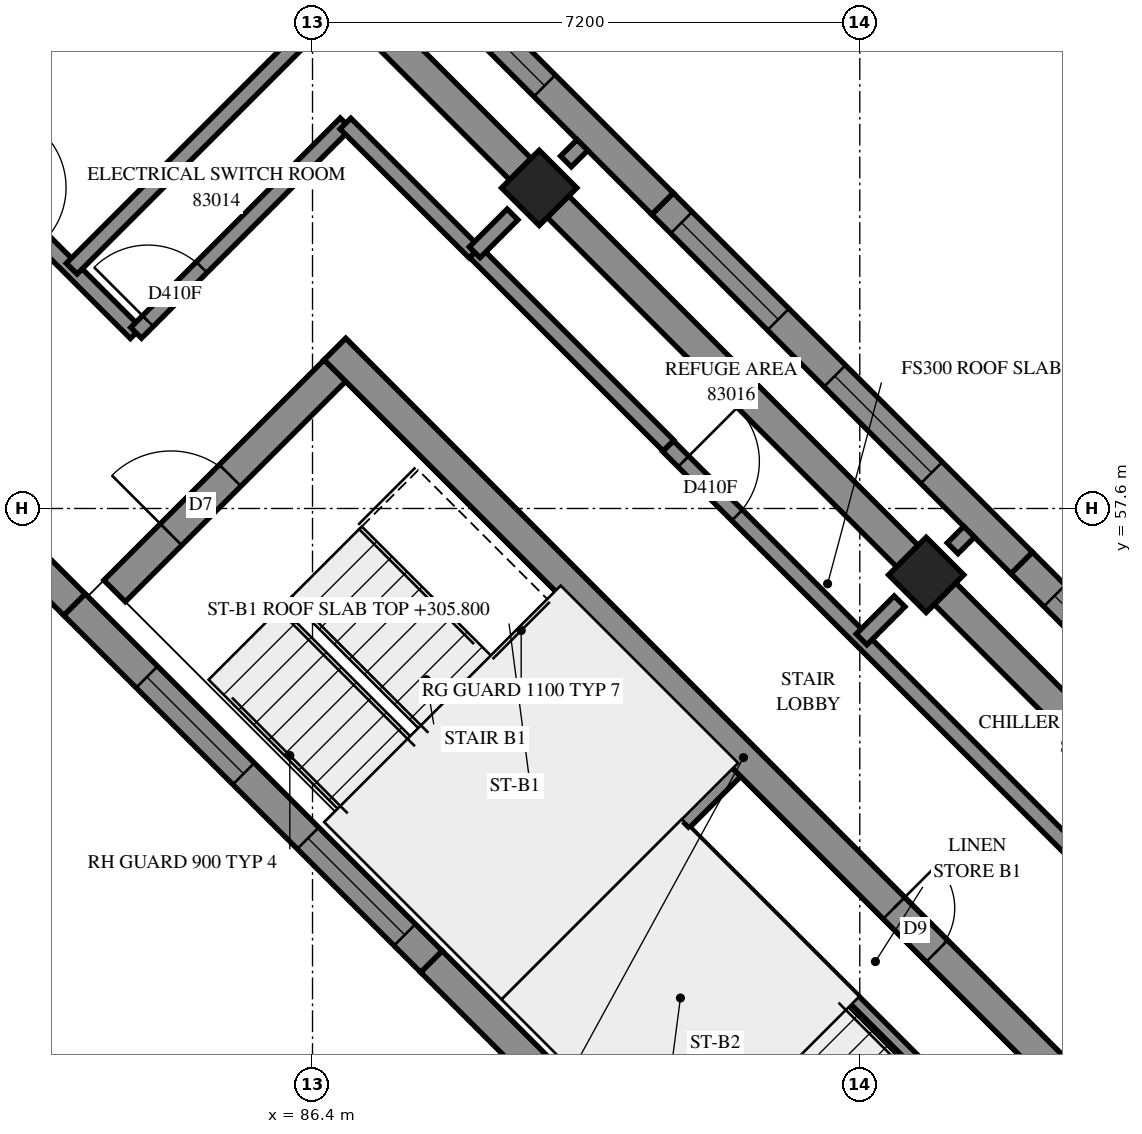
"""IFC4 building model, lengths in metres.
Left out: names, types, materials, properties, quantities, classifications, styles, units other than length and angle.
Written with IfcOpenShell. Run it as: python <this file> out.ifc"""

import sys

from ifc_helpers import new_model, si_unit, direction, frame, frame_2d, origin, origin_2d, place, context, subcontext, project, spatial, polyline, rectangle, outline, extrude, element, fill, save


model = new_model("IFC4")
c1 = context("Model", 3, precision=1e-05, world=origin(), true_north=direction((0.0, 1.0)))
c2 = subcontext(c1, "Body", "Model", "MODEL_VIEW")
j1 = project(units=[si_unit("LENGTHUNIT", "METRE"), si_unit("PLANEANGLEUNIT", "RADIAN")], contexts=[c1])
p1 = place(None, origin())
s1 = spatial("IfcSite", under=j1, at=p1, CompositionType="ELEMENT")
p2 = place(p1, origin())
s2 = spatial("IfcBuilding", under=s1, at=p2, CompositionType="ELEMENT")
p3 = place(p2, frame((0.0, 0.0, 305.8)))
s3 = spatial("IfcBuildingStorey", under=s2, at=p3, CompositionType="ELEMENT", Elevation=305.8)
for number, where, z_axis, x_axis in (
    (1, (89.382, 61.818, 0.0), (0.0, 0.0, 1.0), (0.707, -0.707, 0.0)),
    (2, (94.474, 56.727, 0.0), (0.0, 0.0, 1.0), (0.707, -0.707, 0.0)),
):
    element("IfcColumn", number, at=place(p3, frame(where, z_axis=z_axis, x_axis=x_axis)), inside=s3, PredefinedType="COLUMN", context=c2, shape_type="SweptSolid", body=[
        extrude(rectangle(XDim=0.7, YDim=0.7, at=origin_2d()), origin(), (0.0, 0.0, 1.0), 3.5),
    ])
p4 = place(p3, frame((86.695, 59.696, -0.3), z_axis=(0.0, 0.0, 1.0), x_axis=(0.7071100706, -0.7071034917, 0.0)))
e3 = element("IfcWall", 3, at=p4, inside=s3, PredefinedType="SHEAR", context=c2, shape_type="SweptSolid", body=[
    extrude(outline(polyline([(0.0, 0.0), (15.2, 0.0), (15.2, 3.1), (0.0, 3.1), (0.0, 0.0)])), frame((0.0, 0.2, 0.0), z_axis=(0.0, -1.0, 0.0), x_axis=(1.0, 0.0, 0.0)), (0.0, 0.0, 1.0), 0.4),
])
p5 = place(p4, frame((10.4, 0.0, 0.3)))
e4 = element("IfcOpeningElement", 4, at=p5, cuts=e3, PredefinedType="OPENING", context=c2, shape_type="SweptSolid", body=[
    extrude(rectangle(XDim=0.8, YDim=2.1, at=frame_2d((0.4, 1.05))), frame((0.0, 0.21, 0.0), z_axis=(0.0, -1.0, 0.0), x_axis=(1.0, 0.0, 0.0)), (0.0, 0.0, 1.0), 0.42),
])
p6 = place(p3, frame((83.796, 56.514, -0.3), z_axis=(0.0, 0.0, 1.0), x_axis=(0.7071067812, 0.7071067812, 0.0)))
e5 = element("IfcWall", 5, at=p6, inside=s3, PredefinedType="SHEAR", context=c2, shape_type="SweptSolid", body=[
    extrude(outline(polyline([(0.0, 0.0), (4.1, 0.0), (4.1, 3.1), (0.0, 3.1), (0.0, 0.0)])), frame((0.0, 0.2, 0.0), z_axis=(0.0, -1.0, 0.0), x_axis=(1.0, 0.0, 0.0)), (0.0, 0.0, 1.0), 0.4),
])
p7 = place(p6, frame((1.05, 0.0, 0.3)))
e6 = element("IfcOpeningElement", 6, at=p7, cuts=e5, PredefinedType="OPENING", context=c2, shape_type="SweptSolid", body=[
    extrude(rectangle(XDim=1.1, YDim=2.1, at=frame_2d((0.55, 1.05))), frame((0.0, 0.21, 0.0), z_axis=(0.0, -1.0, 0.0), x_axis=(1.0, 0.0, 0.0)), (0.0, 0.0, 1.0), 0.42),
])
p8 = place(p3, frame((89.029, 51.282, 0.0), z_axis=(0.0, 0.0, 1.0), x_axis=(0.7071067812, 0.7071067812, 0.0)))
e7 = element("IfcWall", 7, at=p8, inside=s3, PredefinedType="SOLIDWALL", context=c2, shape_type="SweptSolid", body=[
    extrude(outline(polyline([(0.0, 0.0), (4.1, 0.0), (4.1, 3.5), (0.0, 3.5), (0.0, 0.0)])), frame((0.0, 0.15, 0.0), z_axis=(0.0, -1.0, 0.0), x_axis=(1.0, 0.0, 0.0)), (0.0, 0.0, 1.0), 0.3),
])
p9 = place(p3, frame((100.48, 52.134, 0.0), z_axis=(0.0, 0.0, 1.0), x_axis=(-0.7071067812, 0.7071067812, 0.0)))
e8 = element("IfcWall", 8, at=p9, inside=s3, PredefinedType="SOLIDWALL", context=c2, shape_type="SweptSolid", body=[
    extrude(outline(polyline([(0.036, -0.2), (6.718, -0.2), (6.718, 0.2), (-0.036, 0.2), (0.036, -0.2)])), origin(), (0.0, 0.0, 1.0), 3.5),
])
p10 = place(p9, frame((1.147, 0.0, 0.7)))
e9 = element("IfcOpeningElement", 9, at=p10, cuts=e8, PredefinedType="OPENING", context=c2, shape_type="SweptSolid", body=[
    extrude(rectangle(XDim=1.8, YDim=2.2, at=frame_2d((0.9, 1.1))), frame((0.0, 0.21, 0.0), z_axis=(0.0, -1.0, 0.0), x_axis=(1.0, 0.0, 0.0)), (0.0, 0.0, 1.0), 0.42),
])
p11 = place(p9, frame((4.306, 0.0, 0.7)))
e10 = element("IfcOpeningElement", 10, at=p11, cuts=e8, PredefinedType="OPENING", context=c2, shape_type="SweptSolid", body=[
    extrude(rectangle(XDim=1.8, YDim=2.2, at=frame_2d((0.9, 1.1))), frame((0.0, 0.21, 0.0), z_axis=(0.0, -1.0, 0.0), x_axis=(1.0, 0.0, 0.0)), (0.0, 0.0, 1.0), 0.42),
])
p12 = place(p3, frame((95.73, 56.884, 0.0), z_axis=(0.0, 0.0, 1.0), x_axis=(-0.7071067812, 0.7071067812, 0.0)))
e11 = element("IfcWall", 11, at=p12, inside=s3, PredefinedType="SOLIDWALL", context=c2, shape_type="SweptSolid", body=[
    extrude(outline(polyline([(0.0, -0.2), (6.682, -0.2), (6.682, 0.2), (0.0, 0.2), (0.0, -0.2)])), origin(), (0.0, 0.0, 1.0), 3.5),
])
p13 = place(p12, frame((1.677, 0.0, 0.7)))
e12 = element("IfcOpeningElement", 12, at=p13, cuts=e11, PredefinedType="OPENING", context=c2, shape_type="SweptSolid", body=[
    extrude(rectangle(XDim=1.8, YDim=2.2, at=frame_2d((0.9, 1.1))), frame((0.0, 0.21, 0.0), z_axis=(0.0, -1.0, 0.0), x_axis=(1.0, 0.0, 0.0)), (0.0, 0.0, 1.0), 0.42),
])
p14 = place(p12, frame((4.529, 0.0, 0.7)))
e13 = element("IfcOpeningElement", 13, at=p14, cuts=e11, PredefinedType="OPENING", context=c2, shape_type="SweptSolid", body=[
    extrude(rectangle(XDim=1.8, YDim=2.2, at=frame_2d((0.9, 1.1))), frame((0.0, 0.21, 0.0), z_axis=(0.0, -1.0, 0.0), x_axis=(1.0, 0.0, 0.0)), (0.0, 0.0, 1.0), 0.42),
])
p15 = place(p3, frame((91.005, 61.609, 0.0), z_axis=(0.0, 0.0, 1.0), x_axis=(-0.7071142638, 0.7070992985, 0.0)))
e14 = element("IfcWall", 14, at=p15, inside=s3, PredefinedType="SOLIDWALL", context=c2, shape_type="SweptSolid", body=[
    extrude(outline(polyline([(0.0, -0.2), (6.682, -0.2), (6.682, 0.2), (0.0, 0.2), (0.0, -0.2)])), origin(), (0.0, 0.0, 1.0), 3.5),
])
p16 = place(p15, frame((2.195, 0.0, 0.7)))
e15 = element("IfcOpeningElement", 15, at=p16, cuts=e14, PredefinedType="OPENING", context=c2, shape_type="SweptSolid", body=[
    extrude(rectangle(XDim=1.8, YDim=2.2, at=frame_2d((0.9, 1.1))), frame((0.0, 0.21, 0.0), z_axis=(0.0, -1.0, 0.0), x_axis=(1.0, 0.0, 0.0)), (0.0, 0.0, 1.0), 0.42),
])
p17 = place(p3, frame((78.548, 61.055, 0.0), z_axis=(0.0, 0.0, 1.0), x_axis=(0.7071067812, -0.7071067812, 0.0)))
e16 = element("IfcWall", 16, at=p17, inside=s3, PredefinedType="SOLIDWALL", context=c2, shape_type="SweptSolid", body=[
    extrude(outline(polyline([(0.036, -0.2), (6.677, -0.2), (6.677, 0.2), (-0.036, 0.2), (0.036, -0.2)])), origin(), (0.0, 0.0, 1.0), 3.5),
])
p18 = place(p17, frame((1.561, 0.0, 0.7)))
e17 = element("IfcOpeningElement", 17, at=p18, cuts=e16, PredefinedType="OPENING", context=c2, shape_type="SweptSolid", body=[
    extrude(rectangle(XDim=1.8, YDim=2.2, at=frame_2d((0.9, 1.1))), frame((0.0, 0.21, 0.0), z_axis=(0.0, -1.0, 0.0), x_axis=(1.0, 0.0, 0.0)), (0.0, 0.0, 1.0), 0.42),
])
p19 = place(p3, frame((83.269, 56.334, 0.0), z_axis=(0.0, 0.0, 1.0), x_axis=(0.7071067812, -0.7071067812, 0.0)))
e18 = element("IfcWall", 18, at=p19, inside=s3, PredefinedType="SOLIDWALL", context=c2, shape_type="SweptSolid", body=[
    extrude(outline(polyline([(0.0, -0.2), (6.641, -0.2), (6.641, 0.2), (0.0, 0.2), (0.0, -0.2)])), origin(), (0.0, 0.0, 1.0), 3.5),
])
p20 = place(p19, frame((1.345, 0.0, 0.7)))
e19 = element("IfcOpeningElement", 19, at=p20, cuts=e18, PredefinedType="OPENING", context=c2, shape_type="SweptSolid", body=[
    extrude(rectangle(XDim=1.8, YDim=2.2, at=frame_2d((0.9, 1.1))), frame((0.0, 0.21, 0.0), z_axis=(0.0, -1.0, 0.0), x_axis=(1.0, 0.0, 0.0)), (0.0, 0.0, 1.0), 0.42),
])
p21 = place(p19, frame((4.343, 0.0, 0.7)))
e20 = element("IfcOpeningElement", 20, at=p21, cuts=e18, PredefinedType="OPENING", context=c2, shape_type="SweptSolid", body=[
    extrude(rectangle(XDim=1.8, YDim=2.2, at=frame_2d((0.9, 1.1))), frame((0.0, 0.21, 0.0), z_axis=(0.0, -1.0, 0.0), x_axis=(1.0, 0.0, 0.0)), (0.0, 0.0, 1.0), 0.42),
])
p22 = place(p3, frame((87.966, 51.638, 0.0), z_axis=(0.0, 0.0, 1.0), x_axis=(0.7071143097, -0.7070992526, 0.0)))
e21 = element("IfcWall", 21, at=p22, inside=s3, PredefinedType="SOLIDWALL", context=c2, shape_type="SweptSolid", body=[
    extrude(outline(polyline([(0.0, -0.2), (6.641, -0.2), (6.641, 0.2), (0.0, 0.2), (0.0, -0.2)])), origin(), (0.0, 0.0, 1.0), 3.5),
])
p23 = place(p22, frame((1.903, 0.0, 0.7)))
e22 = element("IfcOpeningElement", 22, at=p23, cuts=e21, PredefinedType="OPENING", context=c2, shape_type="SweptSolid", body=[
    extrude(rectangle(XDim=1.8, YDim=2.2, at=frame_2d((0.9, 1.1))), frame((0.0, 0.21, 0.0), z_axis=(0.0, -1.0, 0.0), x_axis=(1.0, 0.0, 0.0)), (0.0, 0.0, 1.0), 0.42),
])
p24 = place(p3, frame((91.313, 53.354, 0.0), z_axis=(0.0, 0.0, 1.0), x_axis=(0.7071067812, -0.7071067812, 0.0)))
e23 = element("IfcWall", 23, at=p24, inside=s3, PredefinedType="PARTITIONING", context=c2, shape_type="SweptSolid", body=[
    extrude(outline(polyline([(0.0, 0.0), (5.95, 0.0), (5.95, 3.5), (0.0, 3.5), (0.0, 0.0)])), frame((0.0, 0.075, 0.0), z_axis=(0.0, -1.0, 0.0), x_axis=(1.0, 0.0, 0.0)), (0.0, 0.0, 1.0), 0.15),
])
p25 = place(p3, frame((91.077, 58.421, 0.0), z_axis=(0.0, 0.0, 1.0), x_axis=(0.7070532037, -0.7071603546, 0.0)))
e24 = element("IfcWall", 24, at=p25, inside=s3, PredefinedType="PARTITIONING", context=c2, shape_type="SweptSolid", body=[
    extrude(rectangle(XDim=11.199, YDim=0.2, at=frame_2d((5.6, 0.0))), origin(), (0.0, 0.0, 1.0), 3.5),
])
p26 = place(p25, frame((0.286, 0.0, 0.0)))
e25 = element("IfcOpeningElement", 25, at=p26, cuts=e24, PredefinedType="OPENING", context=c2, shape_type="SweptSolid", body=[
    extrude(rectangle(XDim=1.0, YDim=2.1, at=frame_2d((0.5, 1.05))), frame((0.0, 0.11, 0.0), z_axis=(0.0, -1.0, 0.0), x_axis=(1.0, 0.0, 0.0)), (0.0, 0.0, 1.0), 0.22),
])
p27 = place(p25, frame((7.486, 0.0, 0.0)))
e26 = element("IfcOpeningElement", 26, at=p27, cuts=e24, PredefinedType="OPENING", context=c2, shape_type="SweptSolid", body=[
    extrude(rectangle(XDim=1.0, YDim=2.1, at=frame_2d((0.5, 1.05))), frame((0.0, 0.11, 0.0), z_axis=(0.0, -1.0, 0.0), x_axis=(1.0, 0.0, 0.0)), (0.0, 0.0, 1.0), 0.22),
])
p28 = place(p3, frame((80.787, 63.194, 0.0), z_axis=(0.0, 0.0, 1.0), x_axis=(0.7071067812, -0.7071067812, 0.0)))
e27 = element("IfcWall", 27, at=p28, inside=s3, PredefinedType="PARTITIONING", context=c2, shape_type="SweptSolid", body=[
    extrude(rectangle(XDim=4.65, YDim=0.2, at=frame_2d((2.325, 0.0))), origin(), (0.0, 0.0, 1.0), 3.5),
])
p29 = place(p28, frame((1.939, 0.0, 0.0)))
e28 = element("IfcOpeningElement", 28, at=p29, cuts=e27, PredefinedType="OPENING", context=c2, shape_type="SweptSolid", body=[
    extrude(rectangle(XDim=1.0, YDim=2.1, at=frame_2d((0.5, 1.05))), frame((0.0, 0.11, 0.0), z_axis=(0.0, -1.0, 0.0), x_axis=(1.0, 0.0, 0.0)), (0.0, 0.0, 1.0), 0.22),
])
p30 = place(p3, frame((80.801, 63.417, 0.0), z_axis=(0.0, 0.0, 1.0), x_axis=(0.70732766, 0.7068858333, 0.0)))
e29 = element("IfcWall", 29, at=p30, inside=s3, PredefinedType="PARTITIONING", context=c2, shape_type="SweptSolid", body=[
    extrude(rectangle(XDim=5.432, YDim=0.2, at=frame_2d((2.716, 0.0))), origin(), (0.0, 0.0, 1.0), 3.5),
])
p31 = place(p3, frame((84.079, 59.91, 0.0), z_axis=(0.0, 0.0, 1.0), x_axis=(0.7071067812, 0.7071067812, 0.0)))
e30 = element("IfcWall", 30, at=p31, inside=s3, PredefinedType="PARTITIONING", context=c2, shape_type="SweptSolid", body=[
    extrude(rectangle(XDim=3.898, YDim=0.2, at=frame_2d((1.949, 0.0))), origin(), (0.0, 0.0, 1.0), 3.5),
])
p32 = place(p31, frame((0.219, 0.0, 0.0)))
e31 = element("IfcOpeningElement", 31, at=p32, cuts=e30, PredefinedType="OPENING", context=c2, shape_type="SweptSolid", body=[
    extrude(rectangle(XDim=1.0, YDim=2.1, at=frame_2d((0.5, 1.05))), frame((0.0, 0.11, 0.0), z_axis=(0.0, -1.0, 0.0), x_axis=(1.0, 0.0, 0.0)), (0.0, 0.0, 1.0), 0.22),
])
p33 = place(p3, frame((88.537, 60.973, 0.0), z_axis=(0.0, 0.0, 1.0), x_axis=(0.7071067812, -0.7071067812, 0.0)))
e32 = element("IfcWall", 32, at=p33, inside=s3, PredefinedType="PARTITIONING", context=c2, shape_type="SweptSolid", body=[
    extrude(rectangle(XDim=3.601, YDim=0.2, at=frame_2d((1.8, 0.0))), origin(), (0.0, 0.0, 1.0), 3.5),
])
p34 = place(p3, frame((86.833, 62.663, 0.0), z_axis=(0.0, 0.0, 1.0), x_axis=(0.7075233388, -0.706689978, 0.0)))
e33 = element("IfcWall", 33, at=p34, inside=s3, PredefinedType="PARTITIONING", context=c2, shape_type="SweptSolid", body=[
    extrude(rectangle(XDim=2.4, YDim=0.2, at=frame_2d((1.2, 0.0))), origin(), (0.0, 0.0, 1.0), 3.5),
])
p35 = place(p3, frame((93.624, 55.878, 0.0), z_axis=(0.0, 0.0, 1.0), x_axis=(0.7071067812, 0.7071067812, 0.0)))
e34 = element("IfcWall", 34, at=p35, inside=s3, PredefinedType="PARTITIONING", context=c2, shape_type="SweptSolid", body=[
    extrude(rectangle(XDim=0.707, YDim=0.2, at=frame_2d((0.353, 0.0))), origin(), (0.0, 0.0, 1.0), 3.5),
])
p36 = place(p3, frame((88.534, 60.971, 0.0), z_axis=(0.0, 0.0, 1.0), x_axis=(0.7071067812, 0.7071067812, 0.0)))
e35 = element("IfcWall", 35, at=p36, inside=s3, PredefinedType="PARTITIONING", context=c2, shape_type="SweptSolid", body=[
    extrude(rectangle(XDim=0.704, YDim=0.2, at=frame_2d((0.352, 0.0))), origin(), (0.0, 0.0, 1.0), 3.5),
])
p37 = place(p3, frame((83.232, 60.756, 0.0), z_axis=(0.0, 0.0, 1.0), x_axis=(0.7072593155, 0.706954214, 0.0)))
e36 = element("IfcWall", 36, at=p37, inside=s3, PredefinedType="PARTITIONING", context=c2, shape_type="SweptSolid", body=[
    extrude(outline(polyline([(0.0, -0.1), (5.9, -0.1), (5.9, 0.1), (0.0, 0.1), (0.0, -0.1)])), origin(), (0.0, 0.0, 1.0), 3.5),
])
p38 = place(p3, frame((94.822, 57.076, 0.0), z_axis=(0.0, 0.0, 1.0), x_axis=(0.7071067812, 0.7071067812, 0.0)))
e37 = element("IfcWall", 37, at=p38, inside=s3, PredefinedType="PARTITIONING", context=c2, shape_type="SweptSolid", body=[
    extrude(outline(polyline([(0.0, -0.1), (0.306, -0.1), (0.306, 0.1), (0.0, 0.1), (0.0, -0.1)])), origin(), (0.0, 0.0, 1.0), 3.5),
])
p39 = place(p3, frame((89.734, 62.166, 0.0), z_axis=(0.0, 0.0, 1.0), x_axis=(0.7089070674, 0.7053018997, 0.0)))
e38 = element("IfcWall", 38, at=p39, inside=s3, PredefinedType="PARTITIONING", context=c2, shape_type="SweptSolid", body=[
    extrude(outline(polyline([(0.0, -0.1), (0.305, -0.1), (0.305, 0.1), (0.0, 0.1), (0.0, -0.1)])), origin(), (0.0, 0.0, 1.0), 3.5),
])
p40 = place(p11, origin())
e39 = element("IfcWindow", 39, at=p40, inside=s3, PartitioningType="SINGLE_PANEL", PredefinedType="WINDOW", context=c2, shape_type="SweptSolid", body=[
    extrude(rectangle(XDim=1.8, YDim=2.2, at=frame_2d((0.9, 1.1))), frame((0.0, 0.08, 0.0), z_axis=(0.0, -1.0, 0.0), x_axis=(1.0, 0.0, 0.0)), (0.0, 0.0, 1.0), 0.06),
])
fill(e10, e39)
p41 = place(p13, origin())
e40 = element("IfcWindow", 40, at=p41, inside=s3, PartitioningType="SINGLE_PANEL", PredefinedType="WINDOW", context=c2, shape_type="SweptSolid", body=[
    extrude(rectangle(XDim=1.8, YDim=2.2, at=frame_2d((0.9, 1.1))), frame((0.0, 0.08, 0.0), z_axis=(0.0, -1.0, 0.0), x_axis=(1.0, 0.0, 0.0)), (0.0, 0.0, 1.0), 0.06),
])
fill(e12, e40)
p42 = place(p14, origin())
e41 = element("IfcWindow", 41, at=p42, inside=s3, PartitioningType="SINGLE_PANEL", PredefinedType="WINDOW", context=c2, shape_type="SweptSolid", body=[
    extrude(rectangle(XDim=1.8, YDim=2.2, at=frame_2d((0.9, 1.1))), frame((0.0, 0.08, 0.0), z_axis=(0.0, -1.0, 0.0), x_axis=(1.0, 0.0, 0.0)), (0.0, 0.0, 1.0), 0.06),
])
fill(e13, e41)
p43 = place(p16, origin())
e42 = element("IfcWindow", 42, at=p43, inside=s3, PartitioningType="SINGLE_PANEL", PredefinedType="WINDOW", context=c2, shape_type="SweptSolid", body=[
    extrude(rectangle(XDim=1.8, YDim=2.2, at=frame_2d((0.9, 1.1))), frame((0.0, 0.08, 0.0), z_axis=(0.0, -1.0, 0.0), x_axis=(1.0, 0.0, 0.0)), (0.0, 0.0, 1.0), 0.06),
])
fill(e15, e42)
p44 = place(p20, origin())
e43 = element("IfcWindow", 43, at=p44, inside=s3, PartitioningType="SINGLE_PANEL", PredefinedType="WINDOW", context=c2, shape_type="SweptSolid", body=[
    extrude(rectangle(XDim=1.8, YDim=2.2, at=frame_2d((0.9, 1.1))), frame((0.0, 0.08, 0.0), z_axis=(0.0, -1.0, 0.0), x_axis=(1.0, 0.0, 0.0)), (0.0, 0.0, 1.0), 0.06),
])
fill(e19, e43)
p45 = place(p21, origin())
e44 = element("IfcWindow", 44, at=p45, inside=s3, PartitioningType="SINGLE_PANEL", PredefinedType="WINDOW", context=c2, shape_type="SweptSolid", body=[
    extrude(rectangle(XDim=1.8, YDim=2.2, at=frame_2d((0.9, 1.1))), frame((0.0, 0.08, 0.0), z_axis=(0.0, -1.0, 0.0), x_axis=(1.0, 0.0, 0.0)), (0.0, 0.0, 1.0), 0.06),
])
fill(e20, e44)
p46 = place(p5, origin())
e45 = element("IfcDoor", 45, at=p46, inside=s3, OperationType="SINGLE_SWING_RIGHT", PredefinedType="DOOR", context=c2, shape_type="SweptSolid", body=[
    extrude(rectangle(XDim=0.8, YDim=2.1, at=frame_2d((0.4, 1.05))), frame((0.0, 0.025, 0.0), z_axis=(0.0, -1.0, 0.0), x_axis=(1.0, 0.0, 0.0)), (0.0, 0.0, 1.0), 0.05),
])
fill(e4, e45)
p47 = place(p7, origin())
e46 = element("IfcDoor", 46, at=p47, inside=s3, OperationType="SINGLE_SWING_LEFT", PredefinedType="DOOR", context=c2, shape_type="SweptSolid", body=[
    extrude(rectangle(XDim=1.1, YDim=2.1, at=frame_2d((0.55, 1.05))), frame((0.0, 0.025, 0.0), z_axis=(0.0, -1.0, 0.0), x_axis=(1.0, 0.0, 0.0)), (0.0, 0.0, 1.0), 0.05),
])
fill(e6, e46)
p48 = place(p32, origin())
e47 = element("IfcDoor", 47, at=p48, inside=s3, OperationType="SINGLE_SWING_RIGHT", PredefinedType="DOOR", context=c2, shape_type="SweptSolid", body=[
    extrude(rectangle(XDim=1.0, YDim=2.1, at=frame_2d((0.5, 1.05))), frame((0.0, 0.025, 0.0), z_axis=(0.0, -1.0, 0.0), x_axis=(1.0, 0.0, 0.0)), (0.0, 0.0, 1.0), 0.05),
])
fill(e31, e47)
p49 = place(p26, origin())
e48 = element("IfcDoor", 48, at=p49, inside=s3, OperationType="SINGLE_SWING_LEFT", PredefinedType="DOOR", context=c2, shape_type="SweptSolid", body=[
    extrude(rectangle(XDim=1.0, YDim=2.1, at=frame_2d((0.5, 1.05))), frame((0.0, 0.025, 0.0), z_axis=(0.0, -1.0, 0.0), x_axis=(1.0, 0.0, 0.0)), (0.0, 0.0, 1.0), 0.05),
])
fill(e25, e48)
save(model, sys.argv[1])
